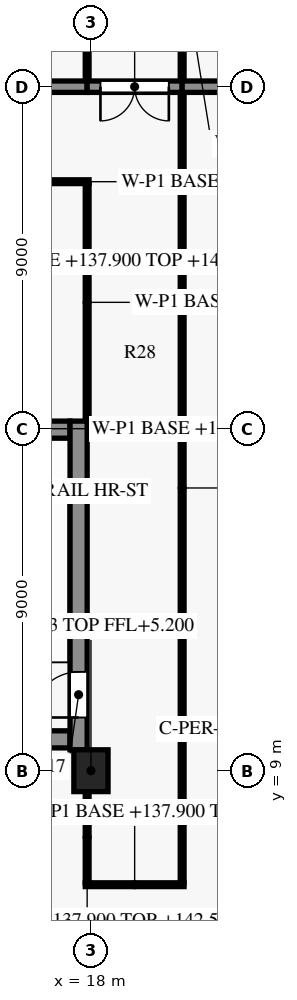
"""IFC4 building model, lengths in metres.
Left out: names, types, materials, properties, quantities, classifications, styles, units other than length and angle.
Written with IfcOpenShell. Run it as: python <this file> out.ifc"""

import sys

from ifc_helpers import new_model, si_unit, direction, frame, frame_2d, origin, origin_2d, place, context, subcontext, project, spatial, rectangle, extrude, element, fill, save


model = new_model("IFC4")
c1 = context("Model", 3, precision=1e-05, world=origin(), true_north=direction((0.0, 1.0)))
c2 = subcontext(c1, "Body", "Model", "MODEL_VIEW")
j1 = project(units=[si_unit("LENGTHUNIT", "METRE"), si_unit("PLANEANGLEUNIT", "RADIAN")], contexts=[c1])
p1 = place(None, origin())
s1 = spatial("IfcSite", under=j1, at=p1, CompositionType="ELEMENT")
p2 = place(p1, origin())
s2 = spatial("IfcBuilding", under=s1, at=p2, CompositionType="ELEMENT")
p3 = place(p2, frame((0.0, 0.0, 137.9)))
s3 = spatial("IfcBuildingStorey", under=s2, at=p3, CompositionType="ELEMENT", Elevation=137.9)
for number, where, z_axis, x_axis in (
    (1, (14.15, 9.825, 0.0), (0.0, 0.0, 1.0), (1.0, 0.0, 0.0)),
    (2, (14.15, 17.975, 0.0), (0.0, 0.0, 1.0), (1.0, 0.0, 0.0)),
):
    element("IfcWall", number, at=place(p3, frame(where, z_axis=z_axis, x_axis=x_axis)), inside=s3, PredefinedType="SHEAR", context=c2, shape_type="SweptSolid", body=[
        extrude(rectangle(XDim=3.3, YDim=0.45, at=frame_2d((1.65, 0.0))), origin(), (0.0, 0.0, 1.0), 5.2),
    ])
p4 = place(p3, frame((17.675, 9.55, 0.0), z_axis=(0.0, 0.0, 1.0), x_axis=(0.0, 1.0, 0.0)))
e3 = element("IfcWall", 3, at=p4, inside=s3, PredefinedType="SHEAR", context=c2, shape_type="SweptSolid", body=[
    extrude(rectangle(XDim=8.65, YDim=0.45, at=frame_2d((4.325, 0.0))), origin(), (0.0, 0.0, 1.0), 5.2),
])
p5 = place(p4, frame((0.85, 0.0, 0.0)))
e4 = element("IfcOpeningElement", 4, at=p5, cuts=e3, PredefinedType="OPENING", context=c2, shape_type="SweptSolid", body=[
    extrude(rectangle(XDim=1.2, YDim=2.2, at=frame_2d((0.6, 1.1))), frame((0.0, 0.235, 0.0), z_axis=(0.0, -1.0, 0.0), x_axis=(1.0, 0.0, 0.0)), (0.0, 0.0, 1.0), 0.47),
])
p6 = place(p3, frame((20.45, 6.0, 0.0), z_axis=(0.0, 0.0, 1.0), x_axis=(-1.0, 0.0, 0.0)))
e5 = element("IfcWall", 5, at=p6, inside=s3, PredefinedType="PARTITIONING", context=c2, shape_type="SweptSolid", body=[
    extrude(rectangle(XDim=2.6, YDim=0.1, at=frame_2d((1.3, 0.0))), origin(), (0.0, 0.0, 1.0), 4.63),
])
p7 = place(p3, frame((17.9, 6.05, 0.0), z_axis=(0.0, 0.0, 1.0), x_axis=(0.0, 1.0, 0.0)))
e6 = element("IfcWall", 6, at=p7, inside=s3, PredefinedType="PARTITIONING", context=c2, shape_type="SweptSolid", body=[
    extrude(rectangle(XDim=2.395, YDim=0.1, at=frame_2d((1.198, 0.0))), origin(), (0.0, 0.0, 1.0), 4.63),
])
p8 = place(p3, frame((17.9, 18.2, 0.0), z_axis=(0.0, 0.0, 1.0), x_axis=(0.0, 1.0, 0.0)))
e7 = element("IfcWall", 7, at=p8, inside=s3, PredefinedType="PARTITIONING", context=c2, shape_type="SweptSolid", body=[
    extrude(rectangle(XDim=6.25, YDim=0.1, at=frame_2d((3.125, 0.0))), origin(), (0.0, 0.0, 1.0), 4.48),
])
p9 = place(p3, frame((17.95, 24.5, 0.0), z_axis=(0.0, 0.0, 1.0), x_axis=(-1.0, 0.0, 0.0)))
e8 = element("IfcWall", 8, at=p9, inside=s3, PredefinedType="PARTITIONING", context=c2, shape_type="SweptSolid", body=[
    extrude(rectangle(XDim=4.0, YDim=0.1, at=frame_2d((2.0, 0.0))), origin(), (0.0, 0.0, 1.0), 4.48),
])
p10 = place(p3, frame((20.4, 26.83, 0.0), z_axis=(0.0, 0.0, 1.0), x_axis=(0.0, -1.0, 0.0)))
e9 = element("IfcWall", 9, at=p10, inside=s3, PredefinedType="PARTITIONING", context=c2, shape_type="SweptSolid", body=[
    extrude(rectangle(XDim=20.78, YDim=0.1, at=frame_2d((10.39, 0.0))), origin(), (0.0, 0.0, 1.0), 3.68),
])
p11 = place(p3, frame((14.0, 27.0, 0.0), z_axis=(0.0, 0.0, 1.0), x_axis=(1.0, 0.0, 0.0)))
e10 = element("IfcWall", 10, at=p11, inside=s3, PredefinedType="PARTITIONING", context=c2, shape_type="SweptSolid", body=[
    extrude(rectangle(XDim=3.9, YDim=0.3, at=frame_2d((1.95, 0.0))), origin(), (0.0, 0.0, 1.0), 4.48),
])
p12 = place(p3, frame((20.4, 27.0, 0.0), z_axis=(0.0, 0.0, 1.0), x_axis=(-1.0, 0.0, 0.0)))
e11 = element("IfcWall", 11, at=p12, inside=s3, PredefinedType="PARTITIONING", context=c2, shape_type="SweptSolid", body=[
    extrude(rectangle(XDim=2.5, YDim=0.3, at=frame_2d((1.25, 0.0))), origin(), (0.0, 0.0, 1.0), 4.48),
])
p13 = place(p12, frame((0.35, 0.0, 0.0)))
e12 = element("IfcOpeningElement", 12, at=p13, cuts=e11, PredefinedType="OPENING", context=c2, shape_type="SweptSolid", body=[
    extrude(rectangle(XDim=1.8, YDim=2.1, at=frame_2d((0.9, 1.05))), frame((0.0, 0.16, 0.0), z_axis=(0.0, -1.0, 0.0), x_axis=(1.0, 0.0, 0.0)), (0.0, 0.0, 1.0), 0.32),
])
p14 = place(p3, frame((23.345, 27.0, 0.0), z_axis=(0.0, 0.0, 1.0), x_axis=(-1.0, 0.0, 0.0)))
e13 = element("IfcWall", 13, at=p14, inside=s3, PredefinedType="PARTITIONING", context=c2, shape_type="SweptSolid", body=[
    extrude(rectangle(XDim=2.945, YDim=0.3, at=frame_2d((1.473, 0.0))), origin(), (0.0, 0.0, 1.0), 4.48),
])
p15 = place(p3, frame((17.9, 27.17, 0.0), z_axis=(0.0, 0.0, 1.0), x_axis=(0.0, 1.0, 0.0)))
e14 = element("IfcWall", 14, at=p15, inside=s3, PredefinedType="PARTITIONING", context=c2, shape_type="SweptSolid", body=[
    extrude(rectangle(XDim=6.28, YDim=0.1, at=frame_2d((3.14, 0.0))), origin(), (0.0, 0.0, 1.0), 4.48),
])
p16 = place(p15, frame((2.68, 0.0, 0.0)))
e15 = element("IfcOpeningElement", 15, at=p16, cuts=e14, PredefinedType="OPENING", context=c2, shape_type="SweptSolid", body=[
    extrude(rectangle(XDim=0.8, YDim=2.1, at=frame_2d((0.4, 1.05))), frame((0.0, 0.06, 0.0), z_axis=(0.0, -1.0, 0.0), x_axis=(1.0, 0.0, 0.0)), (0.0, 0.0, 1.0), 0.12),
])
p17 = place(p3, frame((20.4, 33.45, 0.0), z_axis=(0.0, 0.0, 1.0), x_axis=(0.0, -1.0, 0.0)))
e16 = element("IfcWall", 16, at=p17, inside=s3, PredefinedType="PARTITIONING", context=c2, shape_type="SweptSolid", body=[
    extrude(rectangle(XDim=6.28, YDim=0.1, at=frame_2d((3.14, 0.0))), origin(), (0.0, 0.0, 1.0), 4.48),
])
p18 = place(p17, frame((2.75, 0.0, 0.0)))
e17 = element("IfcOpeningElement", 17, at=p18, cuts=e16, PredefinedType="OPENING", context=c2, shape_type="SweptSolid", body=[
    extrude(rectangle(XDim=0.9, YDim=2.1, at=frame_2d((0.45, 1.05))), frame((0.0, 0.06, 0.0), z_axis=(0.0, -1.0, 0.0), x_axis=(1.0, 0.0, 0.0)), (0.0, 0.0, 1.0), 0.12),
])
p19 = place(p3, frame((18.0, 9.0, 0.0), z_axis=(0.0, 0.0, 1.0), x_axis=(1.0, 0.0, 0.0)))
e18 = element("IfcColumn", 18, at=p19, inside=s3, PredefinedType="COLUMN", context=c2, shape_type="SweptSolid", body=[
    extrude(rectangle(XDim=0.9, YDim=1.1, at=origin_2d()), origin(), (0.0, 0.0, 1.0), 5.2),
])
p20 = place(p5, origin())
e19 = element("IfcDoor", 19, at=p20, inside=s3, OperationType="SINGLE_SWING_LEFT", PredefinedType="DOOR", context=c2, shape_type="SweptSolid", body=[
    extrude(rectangle(XDim=1.2, YDim=2.2, at=frame_2d((0.6, 1.1))), frame((0.0, 0.025, 0.0), z_axis=(0.0, -1.0, 0.0), x_axis=(1.0, 0.0, 0.0)), (0.0, 0.0, 1.0), 0.05),
])
fill(e4, e19)
p21 = place(p13, origin())
e20 = element("IfcDoor", 20, at=p21, inside=s3, OperationType="DOUBLE_DOOR_SINGLE_SWING", PredefinedType="DOOR", context=c2, shape_type="SweptSolid", body=[
    extrude(rectangle(XDim=1.8, YDim=2.1, at=frame_2d((0.9, 1.05))), frame((0.0, 0.025, 0.0), z_axis=(0.0, -1.0, 0.0), x_axis=(1.0, 0.0, 0.0)), (0.0, 0.0, 1.0), 0.05),
])
fill(e12, e20)
save(model, sys.argv[1])
